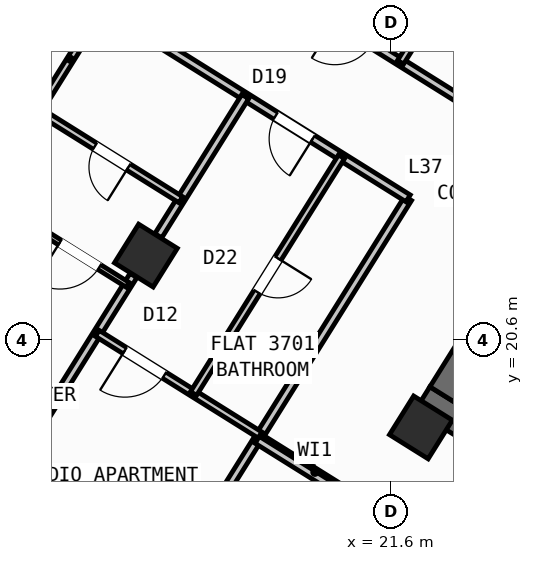
"""IFC4 building model, lengths in metres.
Left out: names, types, materials, properties, quantities, classifications, styles, units other than length and angle.
Written with IfcOpenShell. Run it as: python <this file> out.ifc"""

import sys

from ifc_helpers import new_model, si_unit, direction, frame, frame_2d, origin, origin_2d, place, context, subcontext, project, spatial, rectangle, hollow_rectangle, extrude, source, transform, mapped, element, fill, save


model = new_model("IFC4")
c1 = context("Model", 3, precision=1e-05, world=origin(), true_north=direction((0.0, 1.0)))
c2 = subcontext(c1, "Body", "Model", "MODEL_VIEW")
j1 = project(units=[si_unit("LENGTHUNIT", "METRE"), si_unit("PLANEANGLEUNIT", "RADIAN")], contexts=[c1])
p1 = place(None, origin())
s1 = spatial("IfcSite", under=j1, at=p1, CompositionType="ELEMENT")
p2 = place(p1, origin())
s2 = spatial("IfcBuilding", under=s1, at=p2, CompositionType="ELEMENT")
p3 = place(p2, frame((0.0, 0.0, 147.9)))
s3 = spatial("IfcBuildingStorey", under=s2, at=p3, CompositionType="ELEMENT", Elevation=147.9)
p4 = place(p3, frame((33.366, 12.477, 0.0), z_axis=(0.0, 0.0, 1.0), x_axis=(-0.848047359947, 0.529920442413, 0.0)))
e1 = element("IfcWall", 1, at=p4, inside=s3, PredefinedType="SHEAR", context=c2, shape_type="SweptSolid", body=[
    extrude(rectangle(XDim=13.14, YDim=0.55, at=frame_2d((6.57, 0.0))), origin(), (0.0, 0.0, 1.0), 3.35),
])
p5 = place(p3, frame((26.007, 24.976, 0.0), z_axis=(0.0, 0.0, 1.0), x_axis=(-0.529923795287, -0.848045264823, 0.0)))
e2 = element("IfcWall", 2, at=p5, inside=s3, PredefinedType="SHEAR", context=c2, shape_type="SweptSolid", body=[
    extrude(rectangle(XDim=6.425, YDim=0.55, at=frame_2d((3.212, 0.0))), origin(), (0.0, 0.0, 1.0), 3.35),
])
m1 = source(origin(), c2, "Body", "SweptSolid", [
    extrude(hollow_rectangle(XDim=0.9, YDim=0.9, WallThickness=0.036, at=origin_2d()), origin(), (0.0, 0.0, 1.0), 3.6),
])
for number, where, z_axis, x_axis in (
    (3, (22.191, 18.87, 0.0), (0.0, 0.0, 1.0), (-0.848, 0.53, 0.0)),
    (4, (16.764, 22.261, 0.0), (0.0, 0.0, 1.0), (-0.848, 0.53, 0.0)),
):
    element("IfcColumn", number, at=place(p3, frame(where, z_axis=z_axis, x_axis=x_axis)), inside=s3, PredefinedType="COLUMN", context=c2, shape_type="MappedRepresentation", body=[
        mapped(m1, transform((0.0, 0.0, 0.0), scale=1.0)),
    ])
p6 = place(p3, frame((29.268, 6.429, 0.0), z_axis=(0.0, 0.0, 1.0), x_axis=(-0.848049971435, 0.529916263149, 0.0)))
e5 = element("IfcWall", 5, at=p6, inside=s3, PredefinedType="STANDARD", context=c2, shape_type="SweptSolid", body=[
    extrude(rectangle(XDim=31.588, YDim=0.32, at=frame_2d((15.794, 0.0))), origin(), (0.0, 0.0, 1.0), 3.35),
])
p7 = place(p6, frame((16.362, 0.0, 0.0)))
e6 = element("IfcOpeningElement", 6, at=p7, cuts=e5, PredefinedType="OPENING", context=c2, shape_type="SweptSolid", body=[
    extrude(rectangle(XDim=1.2, YDim=2.15, at=frame_2d((0.6, 1.075))), frame((0.0, 0.17, 0.0), z_axis=(0.0, -1.0, 0.0), x_axis=(1.0, 0.0, 0.0)), (0.0, 0.0, 1.0), 0.34),
])
p8 = place(p6, frame((2.989, 0.0, 0.8)))
e7 = element("IfcOpeningElement", 7, at=p8, cuts=e5, PredefinedType="OPENING", context=c2, shape_type="SweptSolid", body=[
    extrude(rectangle(XDim=2.1, YDim=1.55, at=frame_2d((1.05, 0.775))), frame((0.0, 0.17, 0.0), z_axis=(0.0, -1.0, 0.0), x_axis=(1.0, 0.0, 0.0)), (0.0, 0.0, 1.0), 0.34),
])
p9 = place(p6, frame((8.359, 0.0, 0.8)))
e8 = element("IfcOpeningElement", 8, at=p9, cuts=e5, PredefinedType="OPENING", context=c2, shape_type="SweptSolid", body=[
    extrude(rectangle(XDim=2.1, YDim=1.55, at=frame_2d((1.05, 0.775))), frame((0.0, 0.17, 0.0), z_axis=(0.0, -1.0, 0.0), x_axis=(1.0, 0.0, 0.0)), (0.0, 0.0, 1.0), 0.34),
])
p10 = place(p6, frame((13.284, 0.0, 0.95)))
e9 = element("IfcOpeningElement", 9, at=p10, cuts=e5, PredefinedType="OPENING", context=c2, shape_type="SweptSolid", body=[
    extrude(rectangle(XDim=1.2, YDim=1.4, at=frame_2d((0.6, 0.7))), frame((0.0, 0.17, 0.0), z_axis=(0.0, -1.0, 0.0), x_axis=(1.0, 0.0, 0.0)), (0.0, 0.0, 1.0), 0.34),
])
p11 = place(p6, frame((29.188, 0.0, 0.95)))
e10 = element("IfcOpeningElement", 10, at=p11, cuts=e5, PredefinedType="OPENING", context=c2, shape_type="SweptSolid", body=[
    extrude(rectangle(XDim=1.2, YDim=1.4, at=frame_2d((0.6, 0.7))), frame((0.0, 0.17, 0.0), z_axis=(0.0, -1.0, 0.0), x_axis=(1.0, 0.0, 0.0)), (0.0, 0.0, 1.0), 0.34),
])
p12 = place(p6, frame((19.674, 0.0, 1.0)))
e11 = element("IfcOpeningElement", 11, at=p12, cuts=e5, PredefinedType="OPENING", context=c2, shape_type="SweptSolid", body=[
    extrude(rectangle(XDim=0.9, YDim=1.25, at=frame_2d((0.45, 0.625))), frame((0.0, 0.17, 0.0), z_axis=(0.0, -1.0, 0.0), x_axis=(1.0, 0.0, 0.0)), (0.0, 0.0, 1.0), 0.34),
])
p13 = place(p6, frame((21.896, 0.0, 1.0)))
e12 = element("IfcOpeningElement", 12, at=p13, cuts=e5, PredefinedType="OPENING", context=c2, shape_type="SweptSolid", body=[
    extrude(rectangle(XDim=0.9, YDim=1.25, at=frame_2d((0.45, 0.625))), frame((0.0, 0.17, 0.0), z_axis=(0.0, -1.0, 0.0), x_axis=(1.0, 0.0, 0.0)), (0.0, 0.0, 1.0), 0.34),
])
p14 = place(p6, frame((24.106, 0.0, 1.0)))
e13 = element("IfcOpeningElement", 13, at=p14, cuts=e5, PredefinedType="OPENING", context=c2, shape_type="SweptSolid", body=[
    extrude(rectangle(XDim=0.65, YDim=1.15, at=frame_2d((0.325, 0.575))), frame((0.0, 0.17, 0.0), z_axis=(0.0, -1.0, 0.0), x_axis=(1.0, 0.0, 0.0)), (0.0, 0.0, 1.0), 0.34),
])
p15 = place(p6, frame((26.366, 0.0, 1.0)))
e14 = element("IfcOpeningElement", 14, at=p15, cuts=e5, PredefinedType="OPENING", context=c2, shape_type="SweptSolid", body=[
    extrude(rectangle(XDim=0.9, YDim=1.25, at=frame_2d((0.45, 0.625))), frame((0.0, 0.17, 0.0), z_axis=(0.0, -1.0, 0.0), x_axis=(1.0, 0.0, 0.0)), (0.0, 0.0, 1.0), 0.34),
])
p16 = place(p3, frame((14.138, 41.825, 0.0), z_axis=(0.0, 0.0, 1.0), x_axis=(0.848046498049, -0.529921821731, 0.0)))
e15 = element("IfcWall", 15, at=p16, inside=s3, PredefinedType="STANDARD", context=c2, shape_type="SweptSolid", body=[
    extrude(rectangle(XDim=31.588, YDim=0.32, at=frame_2d((15.794, 0.0))), origin(), (0.0, 0.0, 1.0), 3.35),
])
p17 = place(p16, frame((2.949, 0.0, 0.0)))
e16 = element("IfcOpeningElement", 16, at=p17, cuts=e15, PredefinedType="OPENING", context=c2, shape_type="SweptSolid", body=[
    extrude(rectangle(XDim=1.05, YDim=2.15, at=frame_2d((0.525, 1.075))), frame((0.0, 0.17, 0.0), z_axis=(0.0, -1.0, 0.0), x_axis=(1.0, 0.0, 0.0)), (0.0, 0.0, 1.0), 0.34),
])
p18 = place(p16, frame((0.861, 0.0, 0.85)))
e17 = element("IfcOpeningElement", 17, at=p18, cuts=e15, PredefinedType="OPENING", context=c2, shape_type="SweptSolid", body=[
    extrude(rectangle(XDim=1.5, YDim=1.5, at=frame_2d((0.75, 0.75))), frame((0.0, 0.17, 0.0), z_axis=(0.0, -1.0, 0.0), x_axis=(1.0, 0.0, 0.0)), (0.0, 0.0, 1.0), 0.34),
])
p19 = place(p16, frame((8.494, 0.0, 0.85)))
e18 = element("IfcOpeningElement", 18, at=p19, cuts=e15, PredefinedType="OPENING", context=c2, shape_type="SweptSolid", body=[
    extrude(rectangle(XDim=1.8, YDim=1.5, at=frame_2d((0.9, 0.75))), frame((0.0, 0.17, 0.0), z_axis=(0.0, -1.0, 0.0), x_axis=(1.0, 0.0, 0.0)), (0.0, 0.0, 1.0), 0.34),
])
p20 = place(p16, frame((13.874, 0.0, 0.85)))
e19 = element("IfcOpeningElement", 19, at=p20, cuts=e15, PredefinedType="OPENING", context=c2, shape_type="SweptSolid", body=[
    extrude(rectangle(XDim=1.5, YDim=1.5, at=frame_2d((0.75, 0.75))), frame((0.0, 0.17, 0.0), z_axis=(0.0, -1.0, 0.0), x_axis=(1.0, 0.0, 0.0)), (0.0, 0.0, 1.0), 0.34),
])
p21 = place(p16, frame((17.104, 0.0, 1.0)))
e20 = element("IfcOpeningElement", 20, at=p21, cuts=e15, PredefinedType="OPENING", context=c2, shape_type="SweptSolid", body=[
    extrude(rectangle(XDim=0.9, YDim=1.25, at=frame_2d((0.45, 0.625))), frame((0.0, 0.17, 0.0), z_axis=(0.0, -1.0, 0.0), x_axis=(1.0, 0.0, 0.0)), (0.0, 0.0, 1.0), 0.34),
])
p22 = place(p16, frame((22.144, 0.0, 1.0)))
e21 = element("IfcOpeningElement", 21, at=p22, cuts=e15, PredefinedType="OPENING", context=c2, shape_type="SweptSolid", body=[
    extrude(rectangle(XDim=0.9, YDim=1.25, at=frame_2d((0.45, 0.625))), frame((0.0, 0.17, 0.0), z_axis=(0.0, -1.0, 0.0), x_axis=(1.0, 0.0, 0.0)), (0.0, 0.0, 1.0), 0.34),
])
p23 = place(p16, frame((27.744, 0.0, 1.0)))
e22 = element("IfcOpeningElement", 22, at=p23, cuts=e15, PredefinedType="OPENING", context=c2, shape_type="SweptSolid", body=[
    extrude(rectangle(XDim=0.9, YDim=1.25, at=frame_2d((0.45, 0.625))), frame((0.0, 0.17, 0.0), z_axis=(0.0, -1.0, 0.0), x_axis=(1.0, 0.0, 0.0)), (0.0, 0.0, 1.0), 0.34),
])
p24 = place(p3, frame((21.206, 17.292, 0.0), z_axis=(0.0, 0.0, 1.0), x_axis=(-0.848050851465, 0.529914854792, 0.0)))
e23 = element("IfcWall", 23, at=p24, inside=s3, PredefinedType="PARTITIONING", context=c2, shape_type="SweptSolid", body=[
    extrude(rectangle(XDim=2.61, YDim=0.16, at=frame_2d((1.305, 0.0))), origin(), (0.0, 0.0, 1.0), 3.34),
])
p25 = place(p3, frame((21.938, 23.391, 0.0), z_axis=(0.0, 0.0, 1.0), x_axis=(-0.529924725692, -0.848044683434, 0.0)))
e24 = element("IfcWall", 24, at=p25, inside=s3, PredefinedType="PARTITIONING", context=c2, shape_type="SweptSolid", body=[
    extrude(rectangle(XDim=10.35, YDim=0.16, at=frame_2d((5.175, 0.0))), origin(), (0.0, 0.0, 1.0), 3.34),
])
p26 = place(p3, frame((23.104, 25.256, 0.0), z_axis=(0.0, 0.0, 1.0), x_axis=(-0.848041752158, 0.529929416617, 0.0)))
e25 = element("IfcWall", 25, at=p26, inside=s3, PredefinedType="PARTITIONING", context=c2, shape_type="SweptSolid", body=[
    extrude(rectangle(XDim=16.73, YDim=0.16, at=frame_2d((8.365, 0.0))), origin(), (0.0, 0.0, 1.0), 3.34),
])
p27 = place(p26, frame((2.22, 0.0, 0.0)))
e26 = element("IfcOpeningElement", 26, at=p27, cuts=e25, PredefinedType="OPENING", context=c2, shape_type="SweptSolid", body=[
    extrude(rectangle(XDim=0.86, YDim=2.05, at=frame_2d((0.43, 1.025))), frame((0.0, 0.09, 0.0), z_axis=(0.0, -1.0, 0.0), x_axis=(1.0, 0.0, 0.0)), (0.0, 0.0, 1.0), 0.18),
])
p28 = place(p26, frame((12.084, 0.0, 0.0)))
e27 = element("IfcOpeningElement", 27, at=p28, cuts=e25, PredefinedType="OPENING", context=c2, shape_type="SweptSolid", body=[
    extrude(rectangle(XDim=1.0, YDim=2.1, at=frame_2d((0.5, 1.05))), frame((0.0, 0.09, 0.0), z_axis=(0.0, -1.0, 0.0), x_axis=(1.0, 0.0, 0.0)), (0.0, 0.0, 1.0), 0.18),
])
p29 = place(p3, frame((21.938, 23.391, 0.0), z_axis=(0.0, 0.0, 1.0), x_axis=(-0.848045850158, 0.529922858565, 0.0)))
e28 = element("IfcWall", 28, at=p29, inside=s3, PredefinedType="PARTITIONING", context=c2, shape_type="SweptSolid", body=[
    extrude(rectangle(XDim=16.73, YDim=0.16, at=frame_2d((8.365, 0.0))), origin(), (0.0, 0.0, 1.0), 3.34),
])
p30 = place(p29, frame((2.22, 0.0, 0.0)))
e29 = element("IfcOpeningElement", 29, at=p30, cuts=e28, PredefinedType="OPENING", context=c2, shape_type="SweptSolid", body=[
    extrude(rectangle(XDim=0.86, YDim=2.05, at=frame_2d((0.43, 1.025))), frame((0.0, 0.09, 0.0), z_axis=(0.0, -1.0, 0.0), x_axis=(1.0, 0.0, 0.0)), (0.0, 0.0, 1.0), 0.18),
])
p31 = place(p29, frame((14.22, 0.0, 0.0)))
e30 = element("IfcOpeningElement", 30, at=p31, cuts=e28, PredefinedType="OPENING", context=c2, shape_type="SweptSolid", body=[
    extrude(rectangle(XDim=1.0, YDim=2.1, at=frame_2d((0.5, 1.05))), frame((0.0, 0.09, 0.0), z_axis=(0.0, -1.0, 0.0), x_axis=(1.0, 0.0, 0.0)), (0.0, 0.0, 1.0), 0.18),
])
p32 = place(p3, frame((18.724, 25.399, 0.0), z_axis=(0.0, 0.0, 1.0), x_axis=(-0.529890499457, -0.848066069705, 0.0)))
e31 = element("IfcWall", 31, at=p32, inside=s3, PredefinedType="PARTITIONING", context=c2, shape_type="SweptSolid", body=[
    extrude(rectangle(XDim=3.238, YDim=0.16, at=frame_2d((1.619, 0.0))), origin(), (0.0, 0.0, 1.0), 2.775),
])
p33 = place(p3, frame((16.519, 21.87, 0.0), z_axis=(0.0, 0.0, 1.0), x_axis=(-0.529922447305, -0.848046107144, 0.0)))
e32 = element("IfcWall", 32, at=p33, inside=s3, PredefinedType="PARTITIONING", context=c2, shape_type="SweptSolid", body=[
    extrude(rectangle(XDim=5.451, YDim=0.16, at=frame_2d((2.726, 0.0))), origin(), (0.0, 0.0, 1.0), 2.775),
])
p34 = place(p3, frame((19.019, 18.718, 0.0), z_axis=(0.0, 0.0, 1.0), x_axis=(-0.848059820872, 0.529900500304, 0.0)))
e33 = element("IfcWall", 33, at=p34, inside=s3, PredefinedType="PLUMBINGWALL", context=c2, shape_type="SweptSolid", body=[
    extrude(rectangle(XDim=3.79, YDim=0.14, at=frame_2d((1.895, 0.0))), origin(), (0.0, 0.0, 1.0), 3.34),
])
p35 = place(p34, frame((2.23, 0.0, 0.0)))
e34 = element("IfcOpeningElement", 34, at=p35, cuts=e33, PredefinedType="OPENING", context=c2, shape_type="SweptSolid", body=[
    extrude(rectangle(XDim=0.92, YDim=2.08, at=frame_2d((0.46, 1.04))), frame((0.0, 0.08, 0.0), z_axis=(0.0, -1.0, 0.0), x_axis=(1.0, 0.0, 0.0)), (0.0, 0.0, 1.0), 0.16),
])
p36 = place(p3, frame((20.624, 24.212, 0.0), z_axis=(0.0, 0.0, 1.0), x_axis=(-0.529919283494, -0.848048084121, 0.0)))
e35 = element("IfcWall", 35, at=p36, inside=s3, PredefinedType="PLUMBINGWALL", context=c2, shape_type="SweptSolid", body=[
    extrude(rectangle(XDim=5.51, YDim=0.14, at=frame_2d((2.755, 0.0))), origin(), (0.0, 0.0, 1.0), 2.995),
])
p37 = place(p36, frame((2.365, 0.0, 0.0)))
e36 = element("IfcOpeningElement", 36, at=p37, cuts=e35, PredefinedType="OPENING", context=c2, shape_type="SweptSolid", body=[
    extrude(rectangle(XDim=0.78, YDim=2.05, at=frame_2d((0.39, 1.025))), frame((0.0, 0.08, 0.0), z_axis=(0.0, -1.0, 0.0), x_axis=(1.0, 0.0, 0.0)), (0.0, 0.0, 1.0), 0.16),
])
p38 = place(p3, frame((17.452, 23.364, 0.0), z_axis=(0.0, 0.0, 1.0), x_axis=(-0.848044326704, 0.52992529657, 0.0)))
e37 = element("IfcWall", 37, at=p38, inside=s3, PredefinedType="PLUMBINGWALL", context=c2, shape_type="SweptSolid", body=[
    extrude(rectangle(XDim=8.94, YDim=0.14, at=frame_2d((4.47, 0.0))), origin(), (0.0, 0.0, 1.0), 3.34),
])
p39 = place(p38, frame((5.087, 0.0, 0.0)))
e38 = element("IfcOpeningElement", 38, at=p39, cuts=e37, PredefinedType="OPENING", context=c2, shape_type="SweptSolid", body=[
    extrude(rectangle(XDim=0.78, YDim=2.05, at=frame_2d((0.39, 1.025))), frame((0.0, 0.08, 0.0), z_axis=(0.0, -1.0, 0.0), x_axis=(1.0, 0.0, 0.0)), (0.0, 0.0, 1.0), 0.16),
])
p40 = place(p38, frame((1.218, 0.0, 0.0)))
e39 = element("IfcOpeningElement", 39, at=p40, cuts=e37, PredefinedType="OPENING", context=c2, shape_type="SweptSolid", body=[
    extrude(rectangle(XDim=0.78, YDim=2.05, at=frame_2d((0.39, 1.025))), frame((0.0, 0.08, 0.0), z_axis=(0.0, -1.0, 0.0), x_axis=(1.0, 0.0, 0.0)), (0.0, 0.0, 1.0), 0.16),
])
p41 = place(p3, frame((15.913, 27.156, 0.0), z_axis=(0.0, 0.0, 1.0), x_axis=(-0.529935194983, -0.848038141311, 0.0)))
e40 = element("IfcWall", 40, at=p41, inside=s3, PredefinedType="PLUMBINGWALL", context=c2, shape_type="SweptSolid", body=[
    extrude(rectangle(XDim=2.41, YDim=0.14, at=frame_2d((1.205, 0.0))), origin(), (0.0, 0.0, 1.0), 3.34),
])
p42 = place(p3, frame((16.403, 21.685, 0.0), z_axis=(0.0, 0.0, 1.0), x_axis=(-0.848044326704, 0.52992529657, 0.0)))
e41 = element("IfcWall", 41, at=p42, inside=s3, PredefinedType="PARTITIONING", context=c2, shape_type="SweptSolid", body=[
    extrude(rectangle(XDim=8.94, YDim=0.11, at=frame_2d((4.47, 0.0))), origin(), (0.0, 0.0, 1.0), 3.34),
])
p43 = place(p42, frame((0.657, 0.0, 0.0)))
e42 = element("IfcOpeningElement", 42, at=p43, cuts=e41, PredefinedType="OPENING", context=c2, shape_type="SweptSolid", body=[
    extrude(rectangle(XDim=0.92, YDim=2.08, at=frame_2d((0.46, 1.04))), frame((0.0, 0.065, 0.0), z_axis=(0.0, -1.0, 0.0), x_axis=(1.0, 0.0, 0.0)), (0.0, 0.0, 1.0), 0.13),
])
p44 = place(p42, frame((2.893, 0.0, 0.0)))
e43 = element("IfcOpeningElement", 43, at=p44, cuts=e41, PredefinedType="OPENING", context=c2, shape_type="SweptSolid", body=[
    extrude(rectangle(XDim=0.92, YDim=2.08, at=frame_2d((0.46, 1.04))), frame((0.0, 0.065, 0.0), z_axis=(0.0, -1.0, 0.0), x_axis=(1.0, 0.0, 0.0)), (0.0, 0.0, 1.0), 0.13),
])
p45 = place(p42, frame((5.008, 0.0, 0.0)))
e44 = element("IfcOpeningElement", 44, at=p45, cuts=e41, PredefinedType="OPENING", context=c2, shape_type="SweptSolid", body=[
    extrude(rectangle(XDim=0.92, YDim=2.08, at=frame_2d((0.46, 1.04))), frame((0.0, 0.065, 0.0), z_axis=(0.0, -1.0, 0.0), x_axis=(1.0, 0.0, 0.0)), (0.0, 0.0, 1.0), 0.13),
])
p46 = place(p42, frame((7.363, 0.0, 0.0)))
e45 = element("IfcOpeningElement", 45, at=p46, cuts=e41, PredefinedType="OPENING", context=c2, shape_type="SweptSolid", body=[
    extrude(rectangle(XDim=0.92, YDim=2.08, at=frame_2d((0.46, 1.04))), frame((0.0, 0.065, 0.0), z_axis=(0.0, -1.0, 0.0), x_axis=(1.0, 0.0, 0.0)), (0.0, 0.0, 1.0), 0.13),
])
p47 = place(p3, frame((23.65, 29.054, 0.0), z_axis=(0.0, 0.0, 1.0), x_axis=(-0.529898896701, -0.848060822863, 0.0)))
e46 = element("IfcWall", 46, at=p47, inside=s3, PredefinedType="PLUMBINGWALL", context=c2, shape_type="SweptSolid", body=[
    extrude(rectangle(XDim=3.51, YDim=0.14, at=frame_2d((1.755, 0.0))), origin(), (0.0, 0.0, 1.0), 2.995),
])
p48 = place(p47, frame((1.365, 0.0, 0.0)))
e47 = element("IfcOpeningElement", 47, at=p48, cuts=e46, PredefinedType="OPENING", context=c2, shape_type="SweptSolid", body=[
    extrude(rectangle(XDim=0.78, YDim=2.05, at=frame_2d((0.39, 1.025))), frame((0.0, 0.08, 0.0), z_axis=(0.0, -1.0, 0.0), x_axis=(1.0, 0.0, 0.0)), (0.0, 0.0, 1.0), 0.16),
])
p49 = place(p3, frame((32.164, 10.374, 0.0), z_axis=(0.0, 0.0, 1.0), x_axis=(-0.848044107957, 0.529925646633, 0.0)))
e48 = element("IfcWall", 48, at=p49, inside=s3, PredefinedType="PARTITIONING", context=c2, shape_type="SweptSolid", body=[
    extrude(rectangle(XDim=15.57, YDim=0.16, at=frame_2d((7.785, 0.0))), origin(), (0.0, 0.0, 1.0), 3.34),
])
p50 = place(p49, frame((10.83, 0.0, 0.0)))
e49 = element("IfcOpeningElement", 49, at=p50, cuts=e48, PredefinedType="OPENING", context=c2, shape_type="SweptSolid", body=[
    extrude(rectangle(XDim=1.0, YDim=2.1, at=frame_2d((0.5, 1.05))), frame((0.0, 0.09, 0.0), z_axis=(0.0, -1.0, 0.0), x_axis=(1.0, 0.0, 0.0)), (0.0, 0.0, 1.0), 0.18),
])
m2 = source(origin(), c2, "Body", "SweptSolid", [
    extrude(rectangle(XDim=0.86, YDim=2.05, at=frame_2d((0.43, 1.025))), frame((0.0, 0.025, 0.0), z_axis=(0.0, -1.0, 0.0), x_axis=(1.0, 0.0, 0.0)), (0.0, 0.0, 1.0), 0.05),
])
p51 = place(p30, origin())
e50 = element("IfcDoor", 50, at=p51, inside=s3, OperationType="SINGLE_SWING_LEFT", PredefinedType="DOOR", context=c2, shape_type="MappedRepresentation", body=[
    mapped(m2, transform((0.0, 0.0, 0.0), scale=1.0)),
])
fill(e29, e50)
m3 = source(origin(), c2, "Body", "SweptSolid", [
    extrude(rectangle(XDim=0.92, YDim=2.08, at=frame_2d((0.46, 1.04))), frame((0.0, 0.025, 0.0), z_axis=(0.0, -1.0, 0.0), x_axis=(1.0, 0.0, 0.0)), (0.0, 0.0, 1.0), 0.05),
])
p52 = place(p35, origin())
e51 = element("IfcDoor", 51, at=p52, inside=s3, OperationType="SINGLE_SWING_RIGHT", PredefinedType="DOOR", context=c2, shape_type="MappedRepresentation", body=[
    mapped(m3, transform((0.0, 0.0, 0.0), scale=1.0)),
])
fill(e34, e51)
m4 = source(origin(), c2, "Body", "SweptSolid", [
    extrude(rectangle(XDim=0.78, YDim=2.05, at=frame_2d((0.39, 1.025))), frame((0.0, 0.025, 0.0), z_axis=(0.0, -1.0, 0.0), x_axis=(1.0, 0.0, 0.0)), (0.0, 0.0, 1.0), 0.05),
])
p53 = place(p37, origin())
e52 = element("IfcDoor", 52, at=p53, inside=s3, OperationType="SINGLE_SWING_LEFT", PredefinedType="DOOR", context=c2, shape_type="MappedRepresentation", body=[
    mapped(m4, transform((0.0, 0.0, 0.0), scale=1.0)),
])
fill(e36, e52)
p54 = place(p40, origin())
e53 = element("IfcDoor", 53, at=p54, inside=s3, OperationType="SINGLE_SWING_LEFT", PredefinedType="DOOR", context=c2, shape_type="MappedRepresentation", body=[
    mapped(m4, transform((0.0, 0.0, 0.0), scale=1.0)),
])
fill(e39, e53)
p55 = place(p43, origin())
e54 = element("IfcDoor", 54, at=p55, inside=s3, OperationType="SINGLE_SWING_RIGHT", PredefinedType="DOOR", context=c2, shape_type="MappedRepresentation", body=[
    mapped(m3, transform((0.0, 0.0, 0.0), scale=1.0)),
])
fill(e42, e54)
save(model, sys.argv[1])
